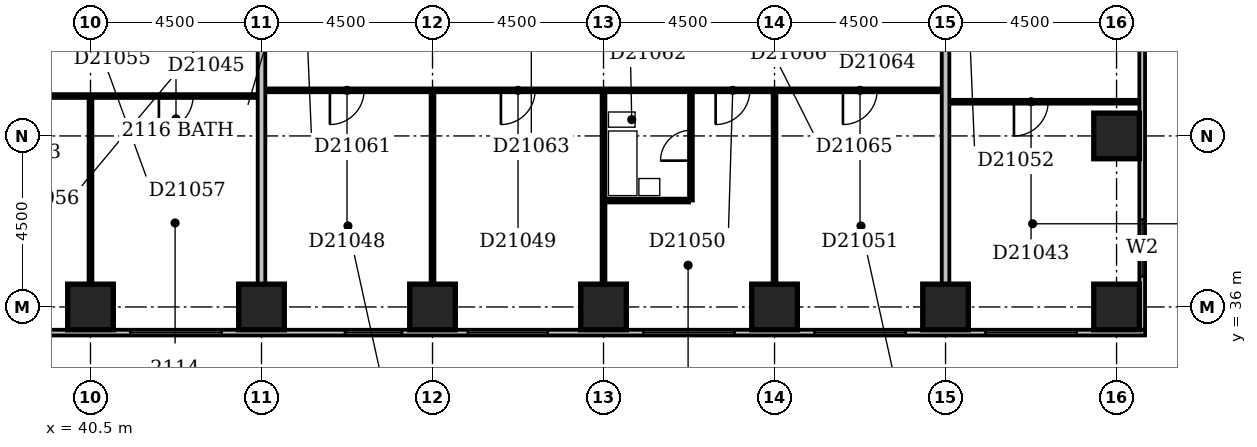
"""IFC4 building model, lengths in metres.
Left out: names, types, materials, properties, quantities, classifications, styles, units other than length and angle.
Written with IfcOpenShell. Run it as: python <this file> out.ifc"""

import sys

from ifc_helpers import new_model, si_unit, direction, frame, frame_2d, origin, origin_2d, place, context, subcontext, project, spatial, rectangle, extrude, element, fill, save


model = new_model("IFC4")
c1 = context("Model", 3, precision=1e-05, world=origin(), true_north=direction((0.0, 1.0)))
c2 = subcontext(c1, "Body", "Model", "MODEL_VIEW")
j1 = project(units=[si_unit("LENGTHUNIT", "METRE"), si_unit("PLANEANGLEUNIT", "RADIAN")], contexts=[c1])
p1 = place(None, origin())
s1 = spatial("IfcSite", under=j1, at=p1, CompositionType="ELEMENT")
p2 = place(p1, origin())
s2 = spatial("IfcBuilding", under=s1, at=p2, CompositionType="ELEMENT")
p3 = place(p2, frame((0.0, 0.0, 86.6)))
s3 = spatial("IfcBuildingStorey", under=s2, at=p3, CompositionType="ELEMENT", Elevation=86.6)
for number, where, z_axis, x_axis in (
    (1, (40.5, 36.0, -0.3), (0.0, 0.0, 1.0), (1.0, 0.0, 0.0)),
    (2, (45.0, 36.0, -0.3), (0.0, 0.0, 1.0), (1.0, 0.0, 0.0)),
    (3, (49.5, 36.0, -0.3), (0.0, 0.0, 1.0), (1.0, 0.0, 0.0)),
    (4, (54.0, 36.0, -0.3), (0.0, 0.0, 1.0), (1.0, 0.0, 0.0)),
    (5, (58.5, 36.0, -0.3), (0.0, 0.0, 1.0), (1.0, 0.0, 0.0)),
    (6, (63.0, 36.0, -0.3), (0.0, 0.0, 1.0), (1.0, 0.0, 0.0)),
    (7, (67.5, 36.0, -0.3), (0.0, 0.0, 1.0), (1.0, 0.0, 0.0)),
    (8, (67.5, 40.5, -0.3), (0.0, 0.0, 1.0), (1.0, 0.0, 0.0)),
):
    element("IfcColumn", number, at=place(p3, frame(where, z_axis=z_axis, x_axis=x_axis)), inside=s3, PredefinedType="COLUMN", context=c2, shape_type="SweptSolid", body=[
        extrude(rectangle(XDim=1.2, YDim=1.2, at=origin_2d()), origin(), (0.0, 0.0, 1.0), 3.6),
    ])
p4 = place(p3, frame((23.1, 35.325, 0.0), z_axis=(0.0, 0.0, 1.0), x_axis=(1.0, 0.0, 0.0)))
e9 = element("IfcWall", 9, at=p4, inside=s3, PredefinedType="STANDARD", context=c2, shape_type="SweptSolid", body=[
    extrude(rectangle(XDim=45.15, YDim=0.15, at=frame_2d((22.575, 0.0))), origin(), (0.0, 0.0, 1.0), 2.7),
])
p5 = place(p4, frame((0.312, 0.0, 0.6)))
e10 = element("IfcOpeningElement", 10, at=p5, cuts=e9, PredefinedType="OPENING", context=c2, shape_type="SweptSolid", body=[
    extrude(rectangle(XDim=2.1, YDim=1.8, at=frame_2d((1.05, 0.9))), frame((0.0, 0.087, 0.0), z_axis=(0.0, -1.0, 0.0), x_axis=(1.0, 0.0, 0.0)), (0.0, 0.0, 1.0), 0.174),
])
p6 = place(p4, frame((4.95, 0.0, 0.6)))
e11 = element("IfcOpeningElement", 11, at=p6, cuts=e9, PredefinedType="OPENING", context=c2, shape_type="SweptSolid", body=[
    extrude(rectangle(XDim=2.4, YDim=1.8, at=frame_2d((1.2, 0.9))), frame((0.0, 0.087, 0.0), z_axis=(0.0, -1.0, 0.0), x_axis=(1.0, 0.0, 0.0)), (0.0, 0.0, 1.0), 0.174),
])
p7 = place(p4, frame((9.45, 0.0, 0.6)))
e12 = element("IfcOpeningElement", 12, at=p7, cuts=e9, PredefinedType="OPENING", context=c2, shape_type="SweptSolid", body=[
    extrude(rectangle(XDim=2.4, YDim=1.8, at=frame_2d((1.2, 0.9))), frame((0.0, 0.087, 0.0), z_axis=(0.0, -1.0, 0.0), x_axis=(1.0, 0.0, 0.0)), (0.0, 0.0, 1.0), 0.174),
])
p8 = place(p4, frame((13.95, 0.0, 0.6)))
e13 = element("IfcOpeningElement", 13, at=p8, cuts=e9, PredefinedType="OPENING", context=c2, shape_type="SweptSolid", body=[
    extrude(rectangle(XDim=2.4, YDim=1.8, at=frame_2d((1.2, 0.9))), frame((0.0, 0.087, 0.0), z_axis=(0.0, -1.0, 0.0), x_axis=(1.0, 0.0, 0.0)), (0.0, 0.0, 1.0), 0.174),
])
p9 = place(p4, frame((18.45, 0.0, 0.6)))
e14 = element("IfcOpeningElement", 14, at=p9, cuts=e9, PredefinedType="OPENING", context=c2, shape_type="SweptSolid", body=[
    extrude(rectangle(XDim=2.4, YDim=1.8, at=frame_2d((1.2, 0.9))), frame((0.0, 0.087, 0.0), z_axis=(0.0, -1.0, 0.0), x_axis=(1.0, 0.0, 0.0)), (0.0, 0.0, 1.0), 0.174),
])
p10 = place(p4, frame((24.097, 0.0, 0.6)))
e15 = element("IfcOpeningElement", 15, at=p10, cuts=e9, PredefinedType="OPENING", context=c2, shape_type="SweptSolid", body=[
    extrude(rectangle(XDim=1.5, YDim=1.8, at=frame_2d((0.75, 0.9))), frame((0.0, 0.087, 0.0), z_axis=(0.0, -1.0, 0.0), x_axis=(1.0, 0.0, 0.0)), (0.0, 0.0, 1.0), 0.174),
])
p11 = place(p4, frame((27.331, 0.0, 0.6)))
e16 = element("IfcOpeningElement", 16, at=p11, cuts=e9, PredefinedType="OPENING", context=c2, shape_type="SweptSolid", body=[
    extrude(rectangle(XDim=2.1, YDim=1.8, at=frame_2d((1.05, 0.9))), frame((0.0, 0.087, 0.0), z_axis=(0.0, -1.0, 0.0), x_axis=(1.0, 0.0, 0.0)), (0.0, 0.0, 1.0), 0.174),
])
p12 = place(p4, frame((31.95, 0.0, 0.6)))
e17 = element("IfcOpeningElement", 17, at=p12, cuts=e9, PredefinedType="OPENING", context=c2, shape_type="SweptSolid", body=[
    extrude(rectangle(XDim=2.4, YDim=1.8, at=frame_2d((1.2, 0.9))), frame((0.0, 0.087, 0.0), z_axis=(0.0, -1.0, 0.0), x_axis=(1.0, 0.0, 0.0)), (0.0, 0.0, 1.0), 0.174),
])
p13 = place(p4, frame((36.45, 0.0, 0.6)))
e18 = element("IfcOpeningElement", 18, at=p13, cuts=e9, PredefinedType="OPENING", context=c2, shape_type="SweptSolid", body=[
    extrude(rectangle(XDim=2.4, YDim=1.8, at=frame_2d((1.2, 0.9))), frame((0.0, 0.087, 0.0), z_axis=(0.0, -1.0, 0.0), x_axis=(1.0, 0.0, 0.0)), (0.0, 0.0, 1.0), 0.174),
])
p14 = place(p4, frame((40.95, 0.0, 0.6)))
e19 = element("IfcOpeningElement", 19, at=p14, cuts=e9, PredefinedType="OPENING", context=c2, shape_type="SweptSolid", body=[
    extrude(rectangle(XDim=2.4, YDim=1.8, at=frame_2d((1.2, 0.9))), frame((0.0, 0.087, 0.0), z_axis=(0.0, -1.0, 0.0), x_axis=(1.0, 0.0, 0.0)), (0.0, 0.0, 1.0), 0.174),
])
p15 = place(p3, frame((68.175, 35.4, 0.0), z_axis=(0.0, 0.0, 1.0), x_axis=(0.0, 1.0, 0.0)))
e20 = element("IfcWall", 20, at=p15, inside=s3, PredefinedType="STANDARD", context=c2, shape_type="SweptSolid", body=[
    extrude(rectangle(XDim=23.85, YDim=0.15, at=frame_2d((11.925, 0.0))), origin(), (0.0, 0.0, 1.0), 2.7),
])
p16 = place(p15, frame((1.403, 0.0, 0.6)))
e21 = element("IfcOpeningElement", 21, at=p16, cuts=e20, PredefinedType="OPENING", context=c2, shape_type="SweptSolid", body=[
    extrude(rectangle(XDim=1.5, YDim=1.8, at=frame_2d((0.75, 0.9))), frame((0.0, 0.087, 0.0), z_axis=(0.0, -1.0, 0.0), x_axis=(1.0, 0.0, 0.0)), (0.0, 0.0, 1.0), 0.174),
])
p17 = place(p3, frame((40.5, 36.6, 0.0), z_axis=(0.0, 0.0, 1.0), x_axis=(0.0, 1.0, 0.0)))
e22 = element("IfcWall", 22, at=p17, inside=s3, PredefinedType="PARTITIONING", context=c2, shape_type="SweptSolid", body=[
    extrude(rectangle(XDim=4.9, YDim=0.1, at=frame_2d((2.45, 0.0))), origin(), (0.0, 0.0, 1.0), 3.3),
])
p18 = place(p3, frame((45.0, 36.6, 0.0), z_axis=(0.0, 0.0, 1.0), x_axis=(0.0, 1.0, 0.0)))
e23 = element("IfcWall", 23, at=p18, inside=s3, PredefinedType="PARTITIONING", context=c2, shape_type="SweptSolid", body=[
    extrude(rectangle(XDim=12.8, YDim=0.2, at=frame_2d((6.4, 0.0))), origin(), (0.0, 0.0, 1.0), 2.6),
])
p19 = place(p3, frame((49.5, 36.6, 0.0), z_axis=(0.0, 0.0, 1.0), x_axis=(0.0, 1.0, 0.0)))
e24 = element("IfcWall", 24, at=p19, inside=s3, PredefinedType="PARTITIONING", context=c2, shape_type="SweptSolid", body=[
    extrude(rectangle(XDim=5.05, YDim=0.1, at=frame_2d((2.525, 0.0))), origin(), (0.0, 0.0, 1.0), 3.3),
])
p20 = place(p3, frame((54.0, 36.6, 0.0), z_axis=(0.0, 0.0, 1.0), x_axis=(0.0, 1.0, 0.0)))
e25 = element("IfcWall", 25, at=p20, inside=s3, PredefinedType="PARTITIONING", context=c2, shape_type="SweptSolid", body=[
    extrude(rectangle(XDim=5.05, YDim=0.1, at=frame_2d((2.525, 0.0))), origin(), (0.0, 0.0, 1.0), 2.6),
])
p21 = place(p3, frame((58.5, 36.6, 0.0), z_axis=(0.0, 0.0, 1.0), x_axis=(0.0, 1.0, 0.0)))
e26 = element("IfcWall", 26, at=p21, inside=s3, PredefinedType="PARTITIONING", context=c2, shape_type="SweptSolid", body=[
    extrude(rectangle(XDim=5.05, YDim=0.1, at=frame_2d((2.525, 0.0))), origin(), (0.0, 0.0, 1.0), 3.3),
])
p22 = place(p3, frame((63.0, 36.6, 0.0), z_axis=(0.0, 0.0, 1.0), x_axis=(0.0, 1.0, 0.0)))
e27 = element("IfcWall", 27, at=p22, inside=s3, PredefinedType="PARTITIONING", context=c2, shape_type="SweptSolid", body=[
    extrude(rectangle(XDim=12.8, YDim=0.2, at=frame_2d((6.4, 0.0))), origin(), (0.0, 0.0, 1.0), 2.4),
])
p23 = place(p3, frame((54.05, 38.8, 0.0), z_axis=(0.0, 0.0, 1.0), x_axis=(1.0, 0.0, 0.0)))
e28 = element("IfcWall", 28, at=p23, inside=s3, PredefinedType="PLUMBINGWALL", context=c2, shape_type="SweptSolid", body=[
    extrude(rectangle(XDim=2.2, YDim=0.1, at=frame_2d((1.1, 0.0))), origin(), (0.0, 0.0, 1.0), 3.3),
])
p24 = place(p3, frame((56.3, 38.8, 0.0), z_axis=(0.0, 0.0, 1.0), x_axis=(0.0, 1.0, 0.0)))
e29 = element("IfcWall", 29, at=p24, inside=s3, PredefinedType="PLUMBINGWALL", context=c2, shape_type="SweptSolid", body=[
    extrude(rectangle(XDim=2.85, YDim=0.1, at=frame_2d((1.425, 0.0))), origin(), (0.0, 0.0, 1.0), 3.3),
])
p25 = place(p24, frame((1.05, 0.0, 0.0)))
e30 = element("IfcOpeningElement", 30, at=p25, cuts=e29, PredefinedType="OPENING", context=c2, shape_type="SweptSolid", body=[
    extrude(rectangle(XDim=0.8, YDim=2.1, at=frame_2d((0.4, 1.05))), frame((0.0, 0.062, 0.0), z_axis=(0.0, -1.0, 0.0), x_axis=(1.0, 0.0, 0.0)), (0.0, 0.0, 1.0), 0.124),
])
p26 = place(p3, frame((63.1, 41.4, 0.0), z_axis=(0.0, 0.0, 1.0), x_axis=(1.0, 0.0, 0.0)))
e31 = element("IfcWall", 31, at=p26, inside=s3, PredefinedType="PARTITIONING", context=c2, shape_type="SweptSolid", body=[
    extrude(rectangle(XDim=5.0, YDim=0.1, at=frame_2d((2.5, 0.0))), origin(), (0.0, 0.0, 1.0), 3.3),
])
p27 = place(p26, frame((1.7, 0.0, 0.0)))
e32 = element("IfcOpeningElement", 32, at=p27, cuts=e31, PredefinedType="OPENING", context=c2, shape_type="SweptSolid", body=[
    extrude(rectangle(XDim=0.9, YDim=2.1, at=frame_2d((0.45, 1.05))), frame((0.0, 0.062, 0.0), z_axis=(0.0, -1.0, 0.0), x_axis=(1.0, 0.0, 0.0)), (0.0, 0.0, 1.0), 0.124),
])
p28 = place(p3, frame((31.6, 41.55, 0.0), z_axis=(0.0, 0.0, 1.0), x_axis=(1.0, 0.0, 0.0)))
e33 = element("IfcWall", 33, at=p28, inside=s3, PredefinedType="PARTITIONING", context=c2, shape_type="SweptSolid", body=[
    extrude(rectangle(XDim=13.3, YDim=0.1, at=frame_2d((6.65, 0.0))), origin(), (0.0, 0.0, 1.0), 3.3),
])
p29 = place(p28, frame((3.9, 0.0, 0.0)))
e34 = element("IfcOpeningElement", 34, at=p29, cuts=e33, PredefinedType="OPENING", context=c2, shape_type="SweptSolid", body=[
    extrude(rectangle(XDim=0.9, YDim=2.1, at=frame_2d((0.45, 1.05))), frame((0.0, 0.062, 0.0), z_axis=(0.0, -1.0, 0.0), x_axis=(1.0, 0.0, 0.0)), (0.0, 0.0, 1.0), 0.124),
])
p30 = place(p28, frame((10.7, 0.0, 0.0)))
e35 = element("IfcOpeningElement", 35, at=p30, cuts=e33, PredefinedType="OPENING", context=c2, shape_type="SweptSolid", body=[
    extrude(rectangle(XDim=0.9, YDim=2.1, at=frame_2d((0.45, 1.05))), frame((0.0, 0.062, 0.0), z_axis=(0.0, -1.0, 0.0), x_axis=(1.0, 0.0, 0.0)), (0.0, 0.0, 1.0), 0.124),
])
p31 = place(p3, frame((45.1, 41.7, 0.0), z_axis=(0.0, 0.0, 1.0), x_axis=(1.0, 0.0, 0.0)))
e36 = element("IfcWall", 36, at=p31, inside=s3, PredefinedType="PARTITIONING", context=c2, shape_type="SweptSolid", body=[
    extrude(rectangle(XDim=17.8, YDim=0.1, at=frame_2d((8.9, 0.0))), origin(), (0.0, 0.0, 1.0), 3.3),
])
p32 = place(p31, frame((1.7, 0.0, 0.0)))
e37 = element("IfcOpeningElement", 37, at=p32, cuts=e36, PredefinedType="OPENING", context=c2, shape_type="SweptSolid", body=[
    extrude(rectangle(XDim=0.9, YDim=2.1, at=frame_2d((0.45, 1.05))), frame((0.0, 0.062, 0.0), z_axis=(0.0, -1.0, 0.0), x_axis=(1.0, 0.0, 0.0)), (0.0, 0.0, 1.0), 0.124),
])
p33 = place(p31, frame((6.2, 0.0, 0.0)))
e38 = element("IfcOpeningElement", 38, at=p33, cuts=e36, PredefinedType="OPENING", context=c2, shape_type="SweptSolid", body=[
    extrude(rectangle(XDim=0.9, YDim=2.1, at=frame_2d((0.45, 1.05))), frame((0.0, 0.062, 0.0), z_axis=(0.0, -1.0, 0.0), x_axis=(1.0, 0.0, 0.0)), (0.0, 0.0, 1.0), 0.124),
])
p34 = place(p31, frame((11.85, 0.0, 0.0)))
e39 = element("IfcOpeningElement", 39, at=p34, cuts=e36, PredefinedType="OPENING", context=c2, shape_type="SweptSolid", body=[
    extrude(rectangle(XDim=0.9, YDim=2.1, at=frame_2d((0.45, 1.05))), frame((0.0, 0.062, 0.0), z_axis=(0.0, -1.0, 0.0), x_axis=(1.0, 0.0, 0.0)), (0.0, 0.0, 1.0), 0.124),
])
p35 = place(p31, frame((15.2, 0.0, 0.0)))
e40 = element("IfcOpeningElement", 40, at=p35, cuts=e36, PredefinedType="OPENING", context=c2, shape_type="SweptSolid", body=[
    extrude(rectangle(XDim=0.9, YDim=2.1, at=frame_2d((0.45, 1.05))), frame((0.0, 0.062, 0.0), z_axis=(0.0, -1.0, 0.0), x_axis=(1.0, 0.0, 0.0)), (0.0, 0.0, 1.0), 0.124),
])
p36 = place(p9, origin())
e41 = element("IfcWindow", 41, at=p36, inside=s3, PartitioningType="SINGLE_PANEL", PredefinedType="WINDOW", context=c2, shape_type="SweptSolid", body=[
    extrude(rectangle(XDim=2.4, YDim=1.8, at=frame_2d((1.2, 0.9))), frame((0.0, 0.03, 0.0), z_axis=(0.0, -1.0, 0.0), x_axis=(1.0, 0.0, 0.0)), (0.0, 0.0, 1.0), 0.06),
])
fill(e14, e41)
p37 = place(p10, origin())
e42 = element("IfcWindow", 42, at=p37, inside=s3, PartitioningType="SINGLE_PANEL", PredefinedType="WINDOW", context=c2, shape_type="SweptSolid", body=[
    extrude(rectangle(XDim=1.5, YDim=1.8, at=frame_2d((0.75, 0.9))), frame((0.0, 0.03, 0.0), z_axis=(0.0, -1.0, 0.0), x_axis=(1.0, 0.0, 0.0)), (0.0, 0.0, 1.0), 0.06),
])
fill(e15, e42)
p38 = place(p11, origin())
e43 = element("IfcWindow", 43, at=p38, inside=s3, PartitioningType="SINGLE_PANEL", PredefinedType="WINDOW", context=c2, shape_type="SweptSolid", body=[
    extrude(rectangle(XDim=2.1, YDim=1.8, at=frame_2d((1.05, 0.9))), frame((0.0, 0.03, 0.0), z_axis=(0.0, -1.0, 0.0), x_axis=(1.0, 0.0, 0.0)), (0.0, 0.0, 1.0), 0.06),
])
fill(e16, e43)
p39 = place(p12, origin())
e44 = element("IfcWindow", 44, at=p39, inside=s3, PartitioningType="SINGLE_PANEL", PredefinedType="WINDOW", context=c2, shape_type="SweptSolid", body=[
    extrude(rectangle(XDim=2.4, YDim=1.8, at=frame_2d((1.2, 0.9))), frame((0.0, 0.03, 0.0), z_axis=(0.0, -1.0, 0.0), x_axis=(1.0, 0.0, 0.0)), (0.0, 0.0, 1.0), 0.06),
])
fill(e17, e44)
p40 = place(p13, origin())
e45 = element("IfcWindow", 45, at=p40, inside=s3, PartitioningType="SINGLE_PANEL", PredefinedType="WINDOW", context=c2, shape_type="SweptSolid", body=[
    extrude(rectangle(XDim=2.4, YDim=1.8, at=frame_2d((1.2, 0.9))), frame((0.0, 0.03, 0.0), z_axis=(0.0, -1.0, 0.0), x_axis=(1.0, 0.0, 0.0)), (0.0, 0.0, 1.0), 0.06),
])
fill(e18, e45)
p41 = place(p14, origin())
e46 = element("IfcWindow", 46, at=p41, inside=s3, PartitioningType="SINGLE_PANEL", PredefinedType="WINDOW", context=c2, shape_type="SweptSolid", body=[
    extrude(rectangle(XDim=2.4, YDim=1.8, at=frame_2d((1.2, 0.9))), frame((0.0, 0.03, 0.0), z_axis=(0.0, -1.0, 0.0), x_axis=(1.0, 0.0, 0.0)), (0.0, 0.0, 1.0), 0.06),
])
fill(e19, e46)
p42 = place(p16, origin())
e47 = element("IfcWindow", 47, at=p42, inside=s3, PartitioningType="SINGLE_PANEL", PredefinedType="WINDOW", context=c2, shape_type="SweptSolid", body=[
    extrude(rectangle(XDim=1.5, YDim=1.8, at=frame_2d((0.75, 0.9))), frame((0.0, 0.03, 0.0), z_axis=(0.0, -1.0, 0.0), x_axis=(1.0, 0.0, 0.0)), (0.0, 0.0, 1.0), 0.06),
])
fill(e21, e47)
p43 = place(p25, origin())
e48 = element("IfcDoor", 48, at=p43, inside=s3, OperationType="SINGLE_SWING_LEFT", PredefinedType="DOOR", context=c2, shape_type="SweptSolid", body=[
    extrude(rectangle(XDim=0.8, YDim=2.1, at=frame_2d((0.4, 1.05))), frame((0.0, 0.025, 0.0), z_axis=(0.0, -1.0, 0.0), x_axis=(1.0, 0.0, 0.0)), (0.0, 0.0, 1.0), 0.05),
])
fill(e30, e48)
p44 = place(p27, frame((0.9, 0.0, 0.0), z_axis=(0.0, 0.0, 1.0), x_axis=(-1.0, 0.0, 0.0)))
e49 = element("IfcDoor", 49, at=p44, inside=s3, OperationType="SINGLE_SWING_RIGHT", PredefinedType="DOOR", context=c2, shape_type="SweptSolid", body=[
    extrude(rectangle(XDim=0.9, YDim=2.1, at=frame_2d((0.45, 1.05))), frame((0.0, 0.025, 0.0), z_axis=(0.0, -1.0, 0.0), x_axis=(1.0, 0.0, 0.0)), (0.0, 0.0, 1.0), 0.05),
])
fill(e32, e49)
p45 = place(p30, frame((0.9, 0.0, 0.0), z_axis=(0.0, 0.0, 1.0), x_axis=(-1.0, 0.0, 0.0)))
e50 = element("IfcDoor", 50, at=p45, inside=s3, OperationType="SINGLE_SWING_RIGHT", PredefinedType="DOOR", context=c2, shape_type="SweptSolid", body=[
    extrude(rectangle(XDim=0.9, YDim=2.1, at=frame_2d((0.45, 1.05))), frame((0.0, 0.025, 0.0), z_axis=(0.0, -1.0, 0.0), x_axis=(1.0, 0.0, 0.0)), (0.0, 0.0, 1.0), 0.05),
])
fill(e35, e50)
p46 = place(p32, frame((0.9, 0.0, 0.0), z_axis=(0.0, 0.0, 1.0), x_axis=(-1.0, 0.0, 0.0)))
e51 = element("IfcDoor", 51, at=p46, inside=s3, OperationType="SINGLE_SWING_RIGHT", PredefinedType="DOOR", context=c2, shape_type="SweptSolid", body=[
    extrude(rectangle(XDim=0.9, YDim=2.1, at=frame_2d((0.45, 1.05))), frame((0.0, 0.025, 0.0), z_axis=(0.0, -1.0, 0.0), x_axis=(1.0, 0.0, 0.0)), (0.0, 0.0, 1.0), 0.05),
])
fill(e37, e51)
p47 = place(p33, frame((0.9, 0.0, 0.0), z_axis=(0.0, 0.0, 1.0), x_axis=(-1.0, 0.0, 0.0)))
e52 = element("IfcDoor", 52, at=p47, inside=s3, OperationType="SINGLE_SWING_RIGHT", PredefinedType="DOOR", context=c2, shape_type="SweptSolid", body=[
    extrude(rectangle(XDim=0.9, YDim=2.1, at=frame_2d((0.45, 1.05))), frame((0.0, 0.025, 0.0), z_axis=(0.0, -1.0, 0.0), x_axis=(1.0, 0.0, 0.0)), (0.0, 0.0, 1.0), 0.05),
])
fill(e38, e52)
p48 = place(p34, frame((0.9, 0.0, 0.0), z_axis=(0.0, 0.0, 1.0), x_axis=(-1.0, 0.0, 0.0)))
e53 = element("IfcDoor", 53, at=p48, inside=s3, OperationType="SINGLE_SWING_RIGHT", PredefinedType="DOOR", context=c2, shape_type="SweptSolid", body=[
    extrude(rectangle(XDim=0.9, YDim=2.1, at=frame_2d((0.45, 1.05))), frame((0.0, 0.025, 0.0), z_axis=(0.0, -1.0, 0.0), x_axis=(1.0, 0.0, 0.0)), (0.0, 0.0, 1.0), 0.05),
])
fill(e39, e53)
p49 = place(p35, frame((0.9, 0.0, 0.0), z_axis=(0.0, 0.0, 1.0), x_axis=(-1.0, 0.0, 0.0)))
e54 = element("IfcDoor", 54, at=p49, inside=s3, OperationType="SINGLE_SWING_RIGHT", PredefinedType="DOOR", context=c2, shape_type="SweptSolid", body=[
    extrude(rectangle(XDim=0.9, YDim=2.1, at=frame_2d((0.45, 1.05))), frame((0.0, 0.025, 0.0), z_axis=(0.0, -1.0, 0.0), x_axis=(1.0, 0.0, 0.0)), (0.0, 0.0, 1.0), 0.05),
])
fill(e40, e54)
save(model, sys.argv[1])
